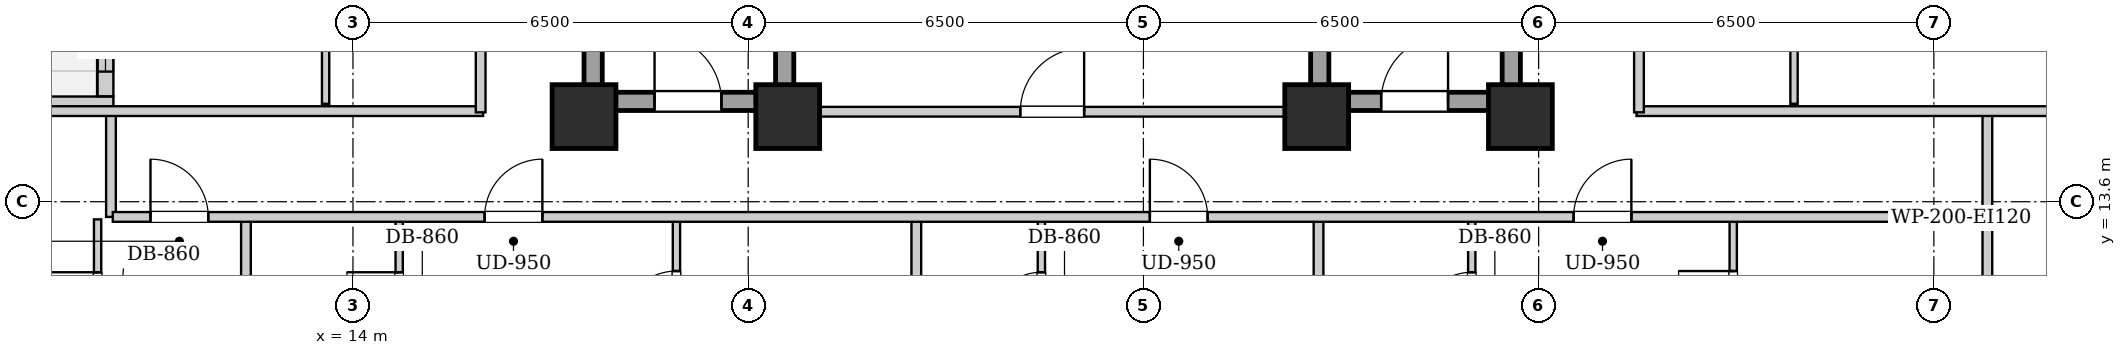
"""IFC4 building model, lengths in metres.
Left out: names, types, materials, properties, quantities, classifications, styles, units other than length and angle.
Written with IfcOpenShell. Run it as: python <this file> out.ifc"""

import sys

from ifc_helpers import new_model, si_unit, direction, frame, frame_2d, origin, origin_2d, place, context, subcontext, project, spatial, rectangle, extrude, element, fill, save


model = new_model("IFC4")
c1 = context("Model", 3, precision=1e-05, world=origin(), true_north=direction((0.0, 1.0)))
c2 = subcontext(c1, "Body", "Model", "MODEL_VIEW")
j1 = project(units=[si_unit("LENGTHUNIT", "METRE"), si_unit("PLANEANGLEUNIT", "RADIAN")], contexts=[c1])
p1 = place(None, origin())
s1 = spatial("IfcSite", under=j1, at=p1, CompositionType="ELEMENT")
p2 = place(p1, origin())
s2 = spatial("IfcBuilding", under=s1, at=p2, CompositionType="ELEMENT")
p3 = place(p2, frame((0.0, 0.0, 87.9)))
s3 = spatial("IfcBuildingStorey", under=s2, at=p3, CompositionType="ELEMENT", Elevation=87.9)
for number, where, z_axis, x_axis in (
    (1, (17.8, 15.0, 0.0), (0.0, 0.0, 1.0), (1.0, 0.0, 0.0)),
    (2, (21.15, 15.0, 0.0), (0.0, 0.0, 1.0), (1.0, 0.0, 0.0)),
    (3, (29.85, 15.0, 0.0), (0.0, 0.0, 1.0), (1.0, 0.0, 0.0)),
    (4, (33.2, 15.0, 0.0), (0.0, 0.0, 1.0), (1.0, 0.0, 0.0)),
):
    element("IfcColumn", number, at=place(p3, frame(where, z_axis=z_axis, x_axis=x_axis)), inside=s3, PredefinedType="COLUMN", context=c2, shape_type="SweptSolid", body=[
        extrude(rectangle(XDim=1.05, YDim=1.05, at=origin_2d()), origin(), (0.0, 0.0, 1.0), 3.2),
    ])
p4 = place(p3, frame((7.66, 15.2, 0.0), z_axis=(0.0, 0.0, 1.0), x_axis=(1.0, 0.0, 0.0)))
e5 = element("IfcWall", 5, at=p4, inside=s3, PredefinedType="SOLIDWALL", context=c2, shape_type="SweptSolid", body=[
    extrude(rectangle(XDim=2.4, YDim=0.26, at=frame_2d((1.2, 0.0))), origin(), (0.0, 0.0, 1.0), 2.94),
])
p5 = place(p3, frame((9.93, 15.334, 0.0), z_axis=(0.0, 0.0, 1.0), x_axis=(0.0, 1.0, 0.0)))
e6 = element("IfcWall", 6, at=p5, inside=s3, PredefinedType="SOLIDWALL", context=c2, shape_type="SweptSolid", body=[
    extrude(rectangle(XDim=3.932, YDim=0.26, at=frame_2d((1.966, 0.0))), origin(), (0.0, 0.0, 1.0), 2.94),
])
p6 = place(p5, frame((1.416, 0.0, 0.0)))
e7 = element("IfcOpeningElement", 7, at=p6, cuts=e6, PredefinedType="OPENING", context=c2, shape_type="SweptSolid", body=[
    extrude(rectangle(XDim=1.1, YDim=2.0, at=frame_2d((0.55, 1.0))), frame((0.0, 0.14, 0.0), z_axis=(0.0, -1.0, 0.0), x_axis=(1.0, 0.0, 0.0)), (0.0, 0.0, 1.0), 0.28),
])
p7 = place(p5, frame((0.406, 0.0, 0.55)))
e8 = element("IfcOpeningElement", 8, at=p7, cuts=e6, PredefinedType="OPENING", context=c2, shape_type="SweptSolid", body=[
    extrude(rectangle(XDim=0.85, YDim=1.2, at=frame_2d((0.425, 0.6))), frame((0.0, 0.14, 0.0), z_axis=(0.0, -1.0, 0.0), x_axis=(1.0, 0.0, 0.0)), (0.0, 0.0, 1.0), 0.28),
])
for number, where, z_axis, x_axis in (
    (9, (17.95, 15.1, 0.0), (0.0, 0.0, 1.0), (0.0, 1.0, 0.0)),
    (10, (21.1, 15.1, 0.0), (0.0, 0.0, 1.0), (0.0, 1.0, 0.0)),
):
    element("IfcWall", number, at=place(p3, frame(where, z_axis=z_axis, x_axis=x_axis)), inside=s3, PredefinedType="SHEAR", context=c2, shape_type="SweptSolid", body=[
        extrude(rectangle(XDim=9.0, YDim=0.3, at=frame_2d((4.5, 0.0))), origin(), (0.0, 0.0, 1.0), 2.94),
    ])
p8 = place(p3, frame((18.1, 15.25, 0.0), z_axis=(0.0, 0.0, 1.0), x_axis=(1.0, 0.0, 0.0)))
e11 = element("IfcWall", 11, at=p8, inside=s3, PredefinedType="SHEAR", context=c2, shape_type="SweptSolid", body=[
    extrude(rectangle(XDim=2.85, YDim=0.3, at=frame_2d((1.425, 0.0))), origin(), (0.0, 0.0, 1.0), 2.94),
])
p9 = place(p8, frame((0.86, 0.0, 0.0)))
e12 = element("IfcOpeningElement", 12, at=p9, cuts=e11, PredefinedType="OPENING", context=c2, shape_type="SweptSolid", body=[
    extrude(rectangle(XDim=1.1, YDim=2.05, at=frame_2d((0.55, 1.025))), frame((0.0, 0.16, 0.0), z_axis=(0.0, -1.0, 0.0), x_axis=(1.0, 0.0, 0.0)), (0.0, 0.0, 1.0), 0.32),
])
for number, where, z_axis, x_axis in (
    (13, (29.9, 15.1, 0.0), (0.0, 0.0, 1.0), (0.0, 1.0, 0.0)),
    (14, (33.05, 15.1, 0.0), (0.0, 0.0, 1.0), (0.0, 1.0, 0.0)),
):
    element("IfcWall", number, at=place(p3, frame(where, z_axis=z_axis, x_axis=x_axis)), inside=s3, PredefinedType="SHEAR", context=c2, shape_type="SweptSolid", body=[
        extrude(rectangle(XDim=9.0, YDim=0.3, at=frame_2d((4.5, 0.0))), origin(), (0.0, 0.0, 1.0), 2.94),
    ])
p10 = place(p3, frame((30.05, 15.25, 0.0), z_axis=(0.0, 0.0, 1.0), x_axis=(1.0, 0.0, 0.0)))
e15 = element("IfcWall", 15, at=p10, inside=s3, PredefinedType="SHEAR", context=c2, shape_type="SweptSolid", body=[
    extrude(rectangle(XDim=2.85, YDim=0.3, at=frame_2d((1.425, 0.0))), origin(), (0.0, 0.0, 1.0), 2.94),
])
p11 = place(p10, frame((0.86, 0.0, 0.0)))
e16 = element("IfcOpeningElement", 16, at=p11, cuts=e15, PredefinedType="OPENING", context=c2, shape_type="SweptSolid", body=[
    extrude(rectangle(XDim=1.1, YDim=2.05, at=frame_2d((0.55, 1.025))), frame((0.0, 0.16, 0.0), z_axis=(0.0, -1.0, 0.0), x_axis=(1.0, 0.0, 0.0)), (0.0, 0.0, 1.0), 0.32),
])
p12 = place(p3, frame((21.25, 15.08, 0.0), z_axis=(0.0, 0.0, 1.0), x_axis=(1.0, 0.0, 0.0)))
e17 = element("IfcWall", 17, at=p12, inside=s3, PredefinedType="PARTITIONING", context=c2, shape_type="SweptSolid", body=[
    extrude(rectangle(XDim=8.5, YDim=0.16, at=frame_2d((4.25, 0.0))), origin(), (0.0, 0.0, 1.0), 2.309),
])
p13 = place(p12, frame((3.725, 0.0, 0.0)))
e18 = element("IfcOpeningElement", 18, at=p13, cuts=e17, PredefinedType="OPENING", context=c2, shape_type="SweptSolid", body=[
    extrude(rectangle(XDim=1.05, YDim=2.05, at=frame_2d((0.525, 1.025))), frame((0.0, 0.09, 0.0), z_axis=(0.0, -1.0, 0.0), x_axis=(1.0, 0.0, 0.0)), (0.0, 0.0, 1.0), 0.18),
])
for number, where, z_axis, x_axis in (
    (19, (10.02, 13.35, 0.0), (0.0, 0.0, 1.0), (0.0, 1.0, 0.0)),
    (20, (40.88, 13.35, 0.0), (0.0, 0.0, 1.0), (0.0, 1.0, 0.0)),
):
    element("IfcWall", number, at=place(p3, frame(where, z_axis=z_axis, x_axis=x_axis)), inside=s3, PredefinedType="PARTITIONING", context=c2, shape_type="SweptSolid", body=[
        extrude(rectangle(XDim=1.74, YDim=0.16, at=frame_2d((0.87, 0.0))), origin(), (0.0, 0.0, 1.0), 2.94),
    ])
p14 = place(p3, frame((7.78, 15.09, 0.0), z_axis=(0.0, 0.0, 1.0), x_axis=(1.0, 0.0, 0.0)))
e21 = element("IfcWall", 21, at=p14, inside=s3, PredefinedType="PARTITIONING", context=c2, shape_type="SweptSolid", body=[
    extrude(rectangle(XDim=8.36, YDim=0.16, at=frame_2d((4.18, 0.0))), origin(), (0.0, 0.0, 1.0), 2.309),
])
p15 = place(p3, frame((35.11, 15.09, 0.0), z_axis=(0.0, 0.0, 1.0), x_axis=(1.0, 0.0, 0.0)))
e22 = element("IfcWall", 22, at=p15, inside=s3, PredefinedType="PARTITIONING", context=c2, shape_type="SweptSolid", body=[
    extrude(rectangle(XDim=8.01, YDim=0.16, at=frame_2d((4.005, 0.0))), origin(), (0.0, 0.0, 1.0), 2.309),
])
p16 = place(p3, frame((9.8, 10.71, 0.0), z_axis=(0.0, 0.0, 1.0), x_axis=(0.0, 1.0, 0.0)))
e23 = element("IfcWall", 23, at=p16, inside=s3, PredefinedType="PARTITIONING", context=c2, shape_type="SweptSolid", body=[
    extrude(rectangle(XDim=2.6, YDim=0.12, at=frame_2d((1.3, 0.0))), origin(), (0.0, 0.0, 1.0), 2.94),
])
p17 = place(p16, frame((0.87, 0.0, 0.0)))
e24 = element("IfcOpeningElement", 24, at=p17, cuts=e23, PredefinedType="OPENING", context=c2, shape_type="SweptSolid", body=[
    extrude(rectangle(XDim=0.86, YDim=2.05, at=frame_2d((0.43, 1.025))), frame((0.0, 0.07, 0.0), z_axis=(0.0, -1.0, 0.0), x_axis=(1.0, 0.0, 0.0)), (0.0, 0.0, 1.0), 0.14),
])
p18 = place(p3, frame((12.24, 2.26, 0.0), z_axis=(0.0, 0.0, 1.0), x_axis=(0.0, 1.0, 0.0)))
e25 = element("IfcWall", 25, at=p18, inside=s3, PredefinedType="PARTITIONING", context=c2, shape_type="SweptSolid", body=[
    extrude(rectangle(XDim=11.05, YDim=0.16, at=frame_2d((5.525, 0.0))), origin(), (0.0, 0.0, 1.0), 2.94),
])
p19 = place(p3, frame((14.76, 10.71, 0.0), z_axis=(0.0, 0.0, 1.0), x_axis=(0.0, 1.0, 0.0)))
e26 = element("IfcWall", 26, at=p19, inside=s3, PredefinedType="PARTITIONING", context=c2, shape_type="SweptSolid", body=[
    extrude(rectangle(XDim=2.6, YDim=0.12, at=frame_2d((1.3, 0.0))), origin(), (0.0, 0.0, 1.0), 2.94),
])
p20 = place(p19, frame((0.87, 0.0, 0.0)))
e27 = element("IfcOpeningElement", 27, at=p20, cuts=e26, PredefinedType="OPENING", context=c2, shape_type="SweptSolid", body=[
    extrude(rectangle(XDim=0.86, YDim=2.05, at=frame_2d((0.43, 1.025))), frame((0.0, 0.07, 0.0), z_axis=(0.0, -1.0, 0.0), x_axis=(1.0, 0.0, 0.0)), (0.0, 0.0, 1.0), 0.14),
])
p21 = place(p3, frame((19.32, 10.71, 0.0), z_axis=(0.0, 0.0, 1.0), x_axis=(0.0, 1.0, 0.0)))
e28 = element("IfcWall", 28, at=p21, inside=s3, PredefinedType="PARTITIONING", context=c2, shape_type="SweptSolid", body=[
    extrude(rectangle(XDim=2.6, YDim=0.12, at=frame_2d((1.3, 0.0))), origin(), (0.0, 0.0, 1.0), 2.94),
])
p22 = place(p21, frame((0.85, 0.0, 0.0)))
e29 = element("IfcOpeningElement", 29, at=p22, cuts=e28, PredefinedType="OPENING", context=c2, shape_type="SweptSolid", body=[
    extrude(rectangle(XDim=0.9, YDim=2.05, at=frame_2d((0.45, 1.025))), frame((0.0, 0.07, 0.0), z_axis=(0.0, -1.0, 0.0), x_axis=(1.0, 0.0, 0.0)), (0.0, 0.0, 1.0), 0.14),
])
p23 = place(p3, frame((23.265, 0.28, 0.0), z_axis=(0.0, 0.0, 1.0), x_axis=(0.0, 1.0, 0.0)))
e30 = element("IfcWall", 30, at=p23, inside=s3, PredefinedType="PARTITIONING", context=c2, shape_type="SweptSolid", body=[
    extrude(rectangle(XDim=13.03, YDim=0.16, at=frame_2d((6.515, 0.0))), origin(), (0.0, 0.0, 1.0), 2.94),
])
p24 = place(p3, frame((25.322, 10.71, 0.0), z_axis=(0.0, 0.0, 1.0), x_axis=(0.0, 1.0, 0.0)))
e31 = element("IfcWall", 31, at=p24, inside=s3, PredefinedType="PARTITIONING", context=c2, shape_type="SweptSolid", body=[
    extrude(rectangle(XDim=2.6, YDim=0.12, at=frame_2d((1.3, 0.0))), origin(), (0.0, 0.0, 1.0), 2.94),
])
p25 = place(p24, frame((0.87, 0.0, 0.0)))
e32 = element("IfcOpeningElement", 32, at=p25, cuts=e31, PredefinedType="OPENING", context=c2, shape_type="SweptSolid", body=[
    extrude(rectangle(XDim=0.86, YDim=2.05, at=frame_2d((0.43, 1.025))), frame((0.0, 0.07, 0.0), z_axis=(0.0, -1.0, 0.0), x_axis=(1.0, 0.0, 0.0)), (0.0, 0.0, 1.0), 0.14),
])
p26 = place(p3, frame((40.88, 10.65, 0.0), z_axis=(0.0, 0.0, 1.0), x_axis=(0.0, 1.0, 0.0)))
e33 = element("IfcWall", 33, at=p26, inside=s3, PredefinedType="PARTITIONING", context=c2, shape_type="SweptSolid", body=[
    extrude(rectangle(XDim=2.66, YDim=0.16, at=frame_2d((1.33, 0.0))), origin(), (0.0, 0.0, 1.0), 2.94),
])
p27 = place(p3, frame((29.88, 0.28, 0.0), z_axis=(0.0, 0.0, 1.0), x_axis=(0.0, 1.0, 0.0)))
e34 = element("IfcWall", 34, at=p27, inside=s3, PredefinedType="PARTITIONING", context=c2, shape_type="SweptSolid", body=[
    extrude(rectangle(XDim=13.03, YDim=0.16, at=frame_2d((6.515, 0.0))), origin(), (0.0, 0.0, 1.0), 2.94),
])
p28 = place(p3, frame((32.4, 10.71, 0.0), z_axis=(0.0, 0.0, 1.0), x_axis=(0.0, 1.0, 0.0)))
e35 = element("IfcWall", 35, at=p28, inside=s3, PredefinedType="PARTITIONING", context=c2, shape_type="SweptSolid", body=[
    extrude(rectangle(XDim=2.6, YDim=0.12, at=frame_2d((1.3, 0.0))), origin(), (0.0, 0.0, 1.0), 2.94),
])
p29 = place(p28, frame((0.87, 0.0, 0.0)))
e36 = element("IfcOpeningElement", 36, at=p29, cuts=e35, PredefinedType="OPENING", context=c2, shape_type="SweptSolid", body=[
    extrude(rectangle(XDim=0.86, YDim=2.05, at=frame_2d((0.43, 1.025))), frame((0.0, 0.07, 0.0), z_axis=(0.0, -1.0, 0.0), x_axis=(1.0, 0.0, 0.0)), (0.0, 0.0, 1.0), 0.14),
])
p30 = place(p3, frame((36.7, 10.71, 0.0), z_axis=(0.0, 0.0, 1.0), x_axis=(0.0, 1.0, 0.0)))
e37 = element("IfcWall", 37, at=p30, inside=s3, PredefinedType="PARTITIONING", context=c2, shape_type="SweptSolid", body=[
    extrude(rectangle(XDim=2.6, YDim=0.12, at=frame_2d((1.3, 0.0))), origin(), (0.0, 0.0, 1.0), 2.94),
])
p31 = place(p30, frame((0.85, 0.0, 0.0)))
e38 = element("IfcOpeningElement", 38, at=p31, cuts=e37, PredefinedType="OPENING", context=c2, shape_type="SweptSolid", body=[
    extrude(rectangle(XDim=0.9, YDim=2.05, at=frame_2d((0.45, 1.025))), frame((0.0, 0.07, 0.0), z_axis=(0.0, -1.0, 0.0), x_axis=(1.0, 0.0, 0.0)), (0.0, 0.0, 1.0), 0.14),
])
for number, where, z_axis, x_axis in (
    (39, (13.55, 15.21, 0.0), (0.0, 0.0, 1.0), (0.0, 1.0, 0.0)),
    (40, (37.7, 15.21, 0.0), (0.0, 0.0, 1.0), (0.0, 1.0, 0.0)),
):
    element("IfcWall", number, at=place(p3, frame(where, z_axis=z_axis, x_axis=x_axis)), inside=s3, PredefinedType="PARTITIONING", context=c2, shape_type="SweptSolid", body=[
        extrude(rectangle(XDim=1.85, YDim=0.12, at=frame_2d((0.925, 0.0))), origin(), (0.0, 0.0, 1.0), 2.94),
    ])
p32 = place(p3, frame((10.05, 13.35, 0.0), z_axis=(0.0, 0.0, 1.0), x_axis=(1.0, 0.0, 0.0)))
e41 = element("IfcWall", 41, at=p32, inside=s3, PredefinedType="PARTITIONING", context=c2, shape_type="SweptSolid", body=[
    extrude(rectangle(XDim=30.8, YDim=0.16, at=frame_2d((15.4, 0.0))), origin(), (0.0, 0.0, 1.0), 2.94),
])
p33 = place(p32, frame((0.62, 0.0, 0.0)))
e42 = element("IfcOpeningElement", 42, at=p33, cuts=e41, PredefinedType="OPENING", context=c2, shape_type="SweptSolid", body=[
    extrude(rectangle(XDim=0.95, YDim=2.1, at=frame_2d((0.475, 1.05))), frame((0.0, 0.09, 0.0), z_axis=(0.0, -1.0, 0.0), x_axis=(1.0, 0.0, 0.0)), (0.0, 0.0, 1.0), 0.18),
])
p34 = place(p32, frame((6.115, 0.0, 0.0)))
e43 = element("IfcOpeningElement", 43, at=p34, cuts=e41, PredefinedType="OPENING", context=c2, shape_type="SweptSolid", body=[
    extrude(rectangle(XDim=0.95, YDim=2.1, at=frame_2d((0.475, 1.05))), frame((0.0, 0.09, 0.0), z_axis=(0.0, -1.0, 0.0), x_axis=(1.0, 0.0, 0.0)), (0.0, 0.0, 1.0), 0.18),
])
p35 = place(p32, frame((17.056, 0.0, 0.0)))
e44 = element("IfcOpeningElement", 44, at=p35, cuts=e41, PredefinedType="OPENING", context=c2, shape_type="SweptSolid", body=[
    extrude(rectangle(XDim=0.95, YDim=2.1, at=frame_2d((0.475, 1.05))), frame((0.0, 0.09, 0.0), z_axis=(0.0, -1.0, 0.0), x_axis=(1.0, 0.0, 0.0)), (0.0, 0.0, 1.0), 0.18),
])
p36 = place(p32, frame((24.025, 0.0, 0.0)))
e45 = element("IfcOpeningElement", 45, at=p36, cuts=e41, PredefinedType="OPENING", context=c2, shape_type="SweptSolid", body=[
    extrude(rectangle(XDim=0.95, YDim=2.1, at=frame_2d((0.475, 1.05))), frame((0.0, 0.09, 0.0), z_axis=(0.0, -1.0, 0.0), x_axis=(1.0, 0.0, 0.0)), (0.0, 0.0, 1.0), 0.18),
])
p37 = place(p3, frame((16.1, 15.07, 0.0), z_axis=(0.0, 0.0, 1.0), x_axis=(0.0, 1.0, 0.0)))
e46 = element("IfcWall", 46, at=p37, inside=s3, PredefinedType="PARTITIONING", context=c2, shape_type="SweptSolid", body=[
    extrude(rectangle(XDim=13.93, YDim=0.16, at=frame_2d((6.965, 0.0))), origin(), (0.0, 0.0, 1.0), 2.94),
])
p38 = place(p37, frame((3.608, 0.0, 0.0)))
e47 = element("IfcOpeningElement", 47, at=p38, cuts=e46, PredefinedType="OPENING", context=c2, shape_type="SweptSolid", body=[
    extrude(rectangle(XDim=0.95, YDim=2.1, at=frame_2d((0.475, 1.05))), frame((0.0, 0.09, 0.0), z_axis=(0.0, -1.0, 0.0), x_axis=(1.0, 0.0, 0.0)), (0.0, 0.0, 1.0), 0.18),
])
p39 = place(p37, frame((10.649, 0.0, 0.0)))
e48 = element("IfcOpeningElement", 48, at=p39, cuts=e46, PredefinedType="OPENING", context=c2, shape_type="SweptSolid", body=[
    extrude(rectangle(XDim=0.95, YDim=2.1, at=frame_2d((0.475, 1.05))), frame((0.0, 0.09, 0.0), z_axis=(0.0, -1.0, 0.0), x_axis=(1.0, 0.0, 0.0)), (0.0, 0.0, 1.0), 0.18),
])
p40 = place(p3, frame((35.15, 15.07, 0.0), z_axis=(0.0, 0.0, 1.0), x_axis=(0.0, 1.0, 0.0)))
e49 = element("IfcWall", 49, at=p40, inside=s3, PredefinedType="PARTITIONING", context=c2, shape_type="SweptSolid", body=[
    extrude(rectangle(XDim=13.93, YDim=0.16, at=frame_2d((6.965, 0.0))), origin(), (0.0, 0.0, 1.0), 2.94),
])
p41 = place(p40, frame((3.608, 0.0, 0.0)))
e50 = element("IfcOpeningElement", 50, at=p41, cuts=e49, PredefinedType="OPENING", context=c2, shape_type="SweptSolid", body=[
    extrude(rectangle(XDim=0.95, YDim=2.1, at=frame_2d((0.475, 1.05))), frame((0.0, 0.09, 0.0), z_axis=(0.0, -1.0, 0.0), x_axis=(1.0, 0.0, 0.0)), (0.0, 0.0, 1.0), 0.18),
])
p42 = place(p40, frame((10.649, 0.0, 0.0)))
e51 = element("IfcOpeningElement", 51, at=p42, cuts=e49, PredefinedType="OPENING", context=c2, shape_type="SweptSolid", body=[
    extrude(rectangle(XDim=0.95, YDim=2.1, at=frame_2d((0.475, 1.05))), frame((0.0, 0.09, 0.0), z_axis=(0.0, -1.0, 0.0), x_axis=(1.0, 0.0, 0.0)), (0.0, 0.0, 1.0), 0.18),
])
p43 = place(p9, origin())
e52 = element("IfcDoor", 52, at=p43, inside=s3, OperationType="SINGLE_SWING_LEFT", PredefinedType="DOOR", context=c2, shape_type="SweptSolid", body=[
    extrude(rectangle(XDim=1.1, YDim=2.05, at=frame_2d((0.55, 1.025))), frame((0.0, 0.025, 0.0), z_axis=(0.0, -1.0, 0.0), x_axis=(1.0, 0.0, 0.0)), (0.0, 0.0, 1.0), 0.05),
])
fill(e12, e52)
p44 = place(p11, origin())
e53 = element("IfcDoor", 53, at=p44, inside=s3, OperationType="SINGLE_SWING_RIGHT", PredefinedType="DOOR", context=c2, shape_type="SweptSolid", body=[
    extrude(rectangle(XDim=1.1, YDim=2.05, at=frame_2d((0.55, 1.025))), frame((0.0, 0.025, 0.0), z_axis=(0.0, -1.0, 0.0), x_axis=(1.0, 0.0, 0.0)), (0.0, 0.0, 1.0), 0.05),
])
fill(e16, e53)
p45 = place(p13, origin())
e54 = element("IfcDoor", 54, at=p45, inside=s3, OperationType="SINGLE_SWING_RIGHT", PredefinedType="DOOR", context=c2, shape_type="SweptSolid", body=[
    extrude(rectangle(XDim=1.05, YDim=2.05, at=frame_2d((0.525, 1.025))), frame((0.0, 0.025, 0.0), z_axis=(0.0, -1.0, 0.0), x_axis=(1.0, 0.0, 0.0)), (0.0, 0.0, 1.0), 0.05),
])
fill(e18, e54)
p46 = place(p17, origin())
e55 = element("IfcDoor", 55, at=p46, inside=s3, OperationType="SINGLE_SWING_RIGHT", PredefinedType="DOOR", context=c2, shape_type="SweptSolid", body=[
    extrude(rectangle(XDim=0.86, YDim=2.05, at=frame_2d((0.43, 1.025))), frame((0.0, 0.025, 0.0), z_axis=(0.0, -1.0, 0.0), x_axis=(1.0, 0.0, 0.0)), (0.0, 0.0, 1.0), 0.05),
])
fill(e24, e55)
p47 = place(p20, origin())
e56 = element("IfcDoor", 56, at=p47, inside=s3, OperationType="SINGLE_SWING_RIGHT", PredefinedType="DOOR", context=c2, shape_type="SweptSolid", body=[
    extrude(rectangle(XDim=0.86, YDim=2.05, at=frame_2d((0.43, 1.025))), frame((0.0, 0.025, 0.0), z_axis=(0.0, -1.0, 0.0), x_axis=(1.0, 0.0, 0.0)), (0.0, 0.0, 1.0), 0.05),
])
fill(e27, e56)
p48 = place(p22, origin())
e57 = element("IfcDoor", 57, at=p48, inside=s3, OperationType="SINGLE_SWING_LEFT", PredefinedType="DOOR", context=c2, shape_type="SweptSolid", body=[
    extrude(rectangle(XDim=0.9, YDim=2.05, at=frame_2d((0.45, 1.025))), frame((0.0, 0.025, 0.0), z_axis=(0.0, -1.0, 0.0), x_axis=(1.0, 0.0, 0.0)), (0.0, 0.0, 1.0), 0.05),
])
fill(e29, e57)
p49 = place(p25, origin())
e58 = element("IfcDoor", 58, at=p49, inside=s3, OperationType="SINGLE_SWING_LEFT", PredefinedType="DOOR", context=c2, shape_type="SweptSolid", body=[
    extrude(rectangle(XDim=0.86, YDim=2.05, at=frame_2d((0.43, 1.025))), frame((0.0, 0.025, 0.0), z_axis=(0.0, -1.0, 0.0), x_axis=(1.0, 0.0, 0.0)), (0.0, 0.0, 1.0), 0.05),
])
fill(e32, e58)
p50 = place(p29, origin())
e59 = element("IfcDoor", 59, at=p50, inside=s3, OperationType="SINGLE_SWING_LEFT", PredefinedType="DOOR", context=c2, shape_type="SweptSolid", body=[
    extrude(rectangle(XDim=0.86, YDim=2.05, at=frame_2d((0.43, 1.025))), frame((0.0, 0.025, 0.0), z_axis=(0.0, -1.0, 0.0), x_axis=(1.0, 0.0, 0.0)), (0.0, 0.0, 1.0), 0.05),
])
fill(e36, e59)
p51 = place(p31, origin())
e60 = element("IfcDoor", 60, at=p51, inside=s3, OperationType="SINGLE_SWING_RIGHT", PredefinedType="DOOR", context=c2, shape_type="SweptSolid", body=[
    extrude(rectangle(XDim=0.9, YDim=2.05, at=frame_2d((0.45, 1.025))), frame((0.0, 0.025, 0.0), z_axis=(0.0, -1.0, 0.0), x_axis=(1.0, 0.0, 0.0)), (0.0, 0.0, 1.0), 0.05),
])
fill(e38, e60)
p52 = place(p33, origin())
e61 = element("IfcDoor", 61, at=p52, inside=s3, OperationType="SINGLE_SWING_LEFT", PredefinedType="DOOR", context=c2, shape_type="SweptSolid", body=[
    extrude(rectangle(XDim=0.95, YDim=2.1, at=frame_2d((0.475, 1.05))), frame((0.0, 0.025, 0.0), z_axis=(0.0, -1.0, 0.0), x_axis=(1.0, 0.0, 0.0)), (0.0, 0.0, 1.0), 0.05),
])
fill(e42, e61)
p53 = place(p34, origin())
e62 = element("IfcDoor", 62, at=p53, inside=s3, OperationType="SINGLE_SWING_RIGHT", PredefinedType="DOOR", context=c2, shape_type="SweptSolid", body=[
    extrude(rectangle(XDim=0.95, YDim=2.1, at=frame_2d((0.475, 1.05))), frame((0.0, 0.025, 0.0), z_axis=(0.0, -1.0, 0.0), x_axis=(1.0, 0.0, 0.0)), (0.0, 0.0, 1.0), 0.05),
])
fill(e43, e62)
p54 = place(p35, origin())
e63 = element("IfcDoor", 63, at=p54, inside=s3, OperationType="SINGLE_SWING_LEFT", PredefinedType="DOOR", context=c2, shape_type="SweptSolid", body=[
    extrude(rectangle(XDim=0.95, YDim=2.1, at=frame_2d((0.475, 1.05))), frame((0.0, 0.025, 0.0), z_axis=(0.0, -1.0, 0.0), x_axis=(1.0, 0.0, 0.0)), (0.0, 0.0, 1.0), 0.05),
])
fill(e44, e63)
p55 = place(p36, origin())
e64 = element("IfcDoor", 64, at=p55, inside=s3, OperationType="SINGLE_SWING_RIGHT", PredefinedType="DOOR", context=c2, shape_type="SweptSolid", body=[
    extrude(rectangle(XDim=0.95, YDim=2.1, at=frame_2d((0.475, 1.05))), frame((0.0, 0.025, 0.0), z_axis=(0.0, -1.0, 0.0), x_axis=(1.0, 0.0, 0.0)), (0.0, 0.0, 1.0), 0.05),
])
fill(e45, e64)
p56 = place(p7, origin())
e65 = element("IfcWindow", 65, at=p56, inside=s3, PartitioningType="SINGLE_PANEL", PredefinedType="WINDOW", context=c2, shape_type="SweptSolid", body=[
    extrude(rectangle(XDim=0.85, YDim=1.2, at=frame_2d((0.425, 0.6))), frame((0.0, 0.03, 0.0), z_axis=(0.0, -1.0, 0.0), x_axis=(1.0, 0.0, 0.0)), (0.0, 0.0, 1.0), 0.06),
])
fill(e8, e65)
save(model, sys.argv[1])
